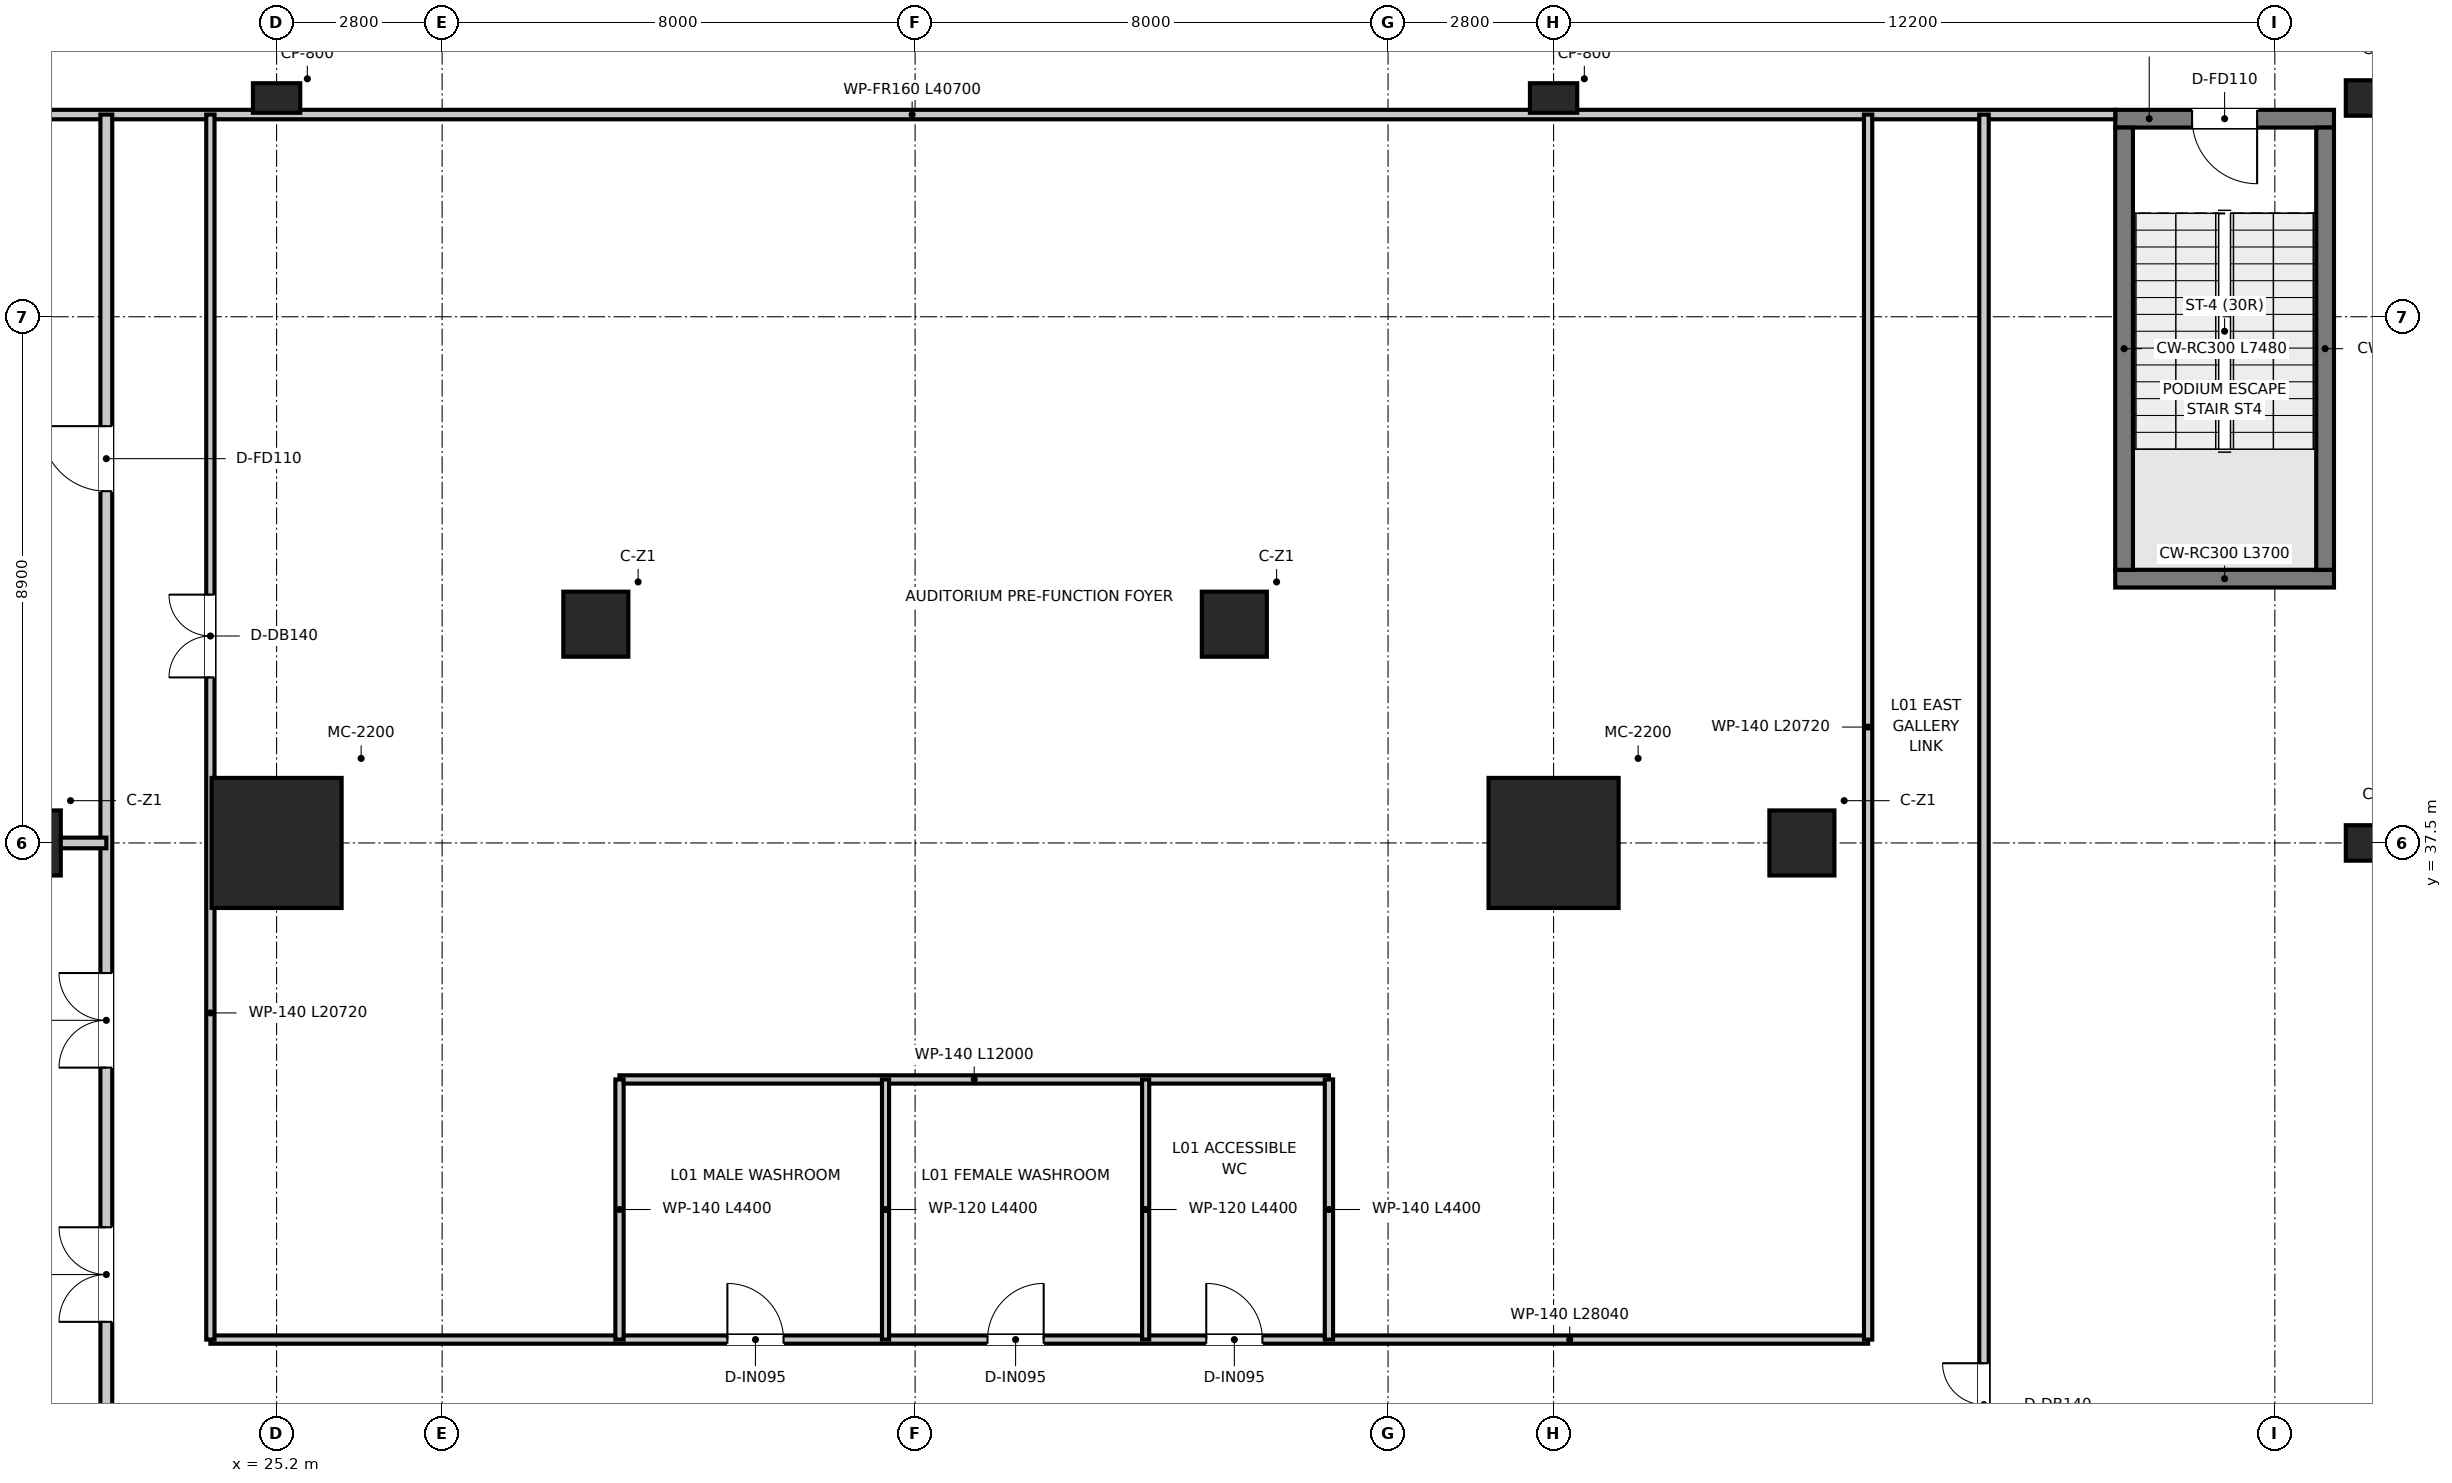
"""IFC4 building model, lengths in metres.
Left out: names, types, materials, properties, quantities, classifications, styles, units other than length and angle.
Written with IfcOpenShell. Run it as: python <this file> out.ifc"""

import sys

from ifc_helpers import new_model, si_unit, direction, frame, frame_2d, origin, origin_2d, place, context, subcontext, project, spatial, rectangle, extrude, source, transform, mapped, element, fill, save


model = new_model("IFC4")
c1 = context("Model", 3, precision=1e-05, world=origin(), true_north=direction((0.0, 1.0)))
c2 = subcontext(c1, "Body", "Model", "MODEL_VIEW")
j1 = project(units=[si_unit("LENGTHUNIT", "METRE"), si_unit("PLANEANGLEUNIT", "RADIAN")], contexts=[c1])
p1 = place(None, origin())
s1 = spatial("IfcSite", under=j1, at=p1, CompositionType="ELEMENT")
p2 = place(p1, origin())
s2 = spatial("IfcBuilding", under=s1, at=p2, CompositionType="ELEMENT")
p3 = place(p2, frame((0.0, 0.0, 5.4)))
s3 = spatial("IfcBuildingStorey", under=s2, at=p3, CompositionType="ELEMENT", Elevation=5.4)
p4 = place(p3, frame((56.3, 41.97, 0.0), z_axis=(0.0, 0.0, 1.0), x_axis=(1.0, 0.0, 0.0)))
e1 = element("IfcWall", 1, at=p4, inside=s3, PredefinedType="SHEAR", context=c2, shape_type="SweptSolid", body=[
    extrude(rectangle(XDim=3.7, YDim=0.3, at=frame_2d((1.85, 0.0))), origin(), (0.0, 0.0, 1.0), 5.0),
])
p5 = place(p3, frame((60.0, 49.75, 0.0), z_axis=(0.0, 0.0, 1.0), x_axis=(-1.0, 0.0, 0.0)))
e2 = element("IfcWall", 2, at=p5, inside=s3, PredefinedType="SHEAR", context=c2, shape_type="SweptSolid", body=[
    extrude(rectangle(XDim=3.7, YDim=0.3, at=frame_2d((1.85, 0.0))), origin(), (0.0, 0.0, 1.0), 5.0),
])
p6 = place(p5, frame((1.3, 0.0, 0.0)))
e3 = element("IfcOpeningElement", 3, at=p6, cuts=e2, PredefinedType="OPENING", context=c2, shape_type="SweptSolid", body=[
    extrude(rectangle(XDim=1.1, YDim=2.15, at=frame_2d((0.55, 1.075))), frame((0.0, 0.16, 0.0), z_axis=(0.0, -1.0, 0.0), x_axis=(1.0, 0.0, 0.0)), (0.0, 0.0, 1.0), 0.32),
])
for number, where, z_axis, x_axis in (
    (4, (56.45, 42.12, 0.0), (0.0, 0.0, 1.0), (0.0, 1.0, 0.0)),
    (5, (59.85, 42.12, 0.0), (0.0, 0.0, 1.0), (0.0, 1.0, 0.0)),
):
    element("IfcWall", number, at=place(p3, frame(where, z_axis=z_axis, x_axis=x_axis)), inside=s3, PredefinedType="SHEAR", context=c2, shape_type="SweptSolid", body=[
        extrude(rectangle(XDim=7.48, YDim=0.3, at=frame_2d((3.74, 0.0))), origin(), (0.0, 0.0, 1.0), 5.0),
    ])
m1 = source(origin(), c2, "Body", "SweptSolid", [
    extrude(rectangle(XDim=2.2, YDim=2.2, at=origin_2d()), origin(), (0.0, 0.0, 1.0), 5.0),
])
for number, where, z_axis, x_axis in (
    (6, (46.8, 37.5, 0.0), (0.0, 0.0, 1.0), (1.0, 0.0, 0.0)),
    (7, (25.2, 37.5, 0.0), (0.0, 0.0, 1.0), (1.0, 0.0, 0.0)),
):
    element("IfcColumn", number, at=place(p3, frame(where, z_axis=z_axis, x_axis=x_axis)), inside=s3, PredefinedType="USERDEFINED", context=c2, shape_type="MappedRepresentation", body=[
        mapped(m1, transform((0.0, 0.0, 0.0), x_axis=(1.0, 0.0, 0.0), y_axis=(0.0, 1.0, 0.0), z_axis=(0.0, 0.0, 1.0), scale=1.0)),
    ])
m2 = source(origin(), c2, "Body", "SweptSolid", [
    extrude(rectangle(XDim=1.1, YDim=1.1, at=origin_2d()), origin(), (0.0, 0.0, 1.0), 5.0),
])
for number, where, z_axis, x_axis in (
    (8, (21.0, 37.5, 0.0), (0.0, 0.0, 1.0), (1.0, 0.0, 0.0)),
    (9, (30.6, 41.2, 0.0), (0.0, 0.0, 1.0), (1.0, 0.0, 0.0)),
    (10, (41.4, 41.2, 0.0), (0.0, 0.0, 1.0), (1.0, 0.0, 0.0)),
    (11, (51.0, 37.5, 0.0), (0.0, 0.0, 1.0), (1.0, 0.0, 0.0)),
):
    element("IfcColumn", number, at=place(p3, frame(where, z_axis=z_axis, x_axis=x_axis)), inside=s3, PredefinedType="COLUMN", context=c2, shape_type="MappedRepresentation", body=[
        mapped(m2, transform((0.0, 0.0, 0.0), x_axis=(1.0, 0.0, 0.0), y_axis=(0.0, 1.0, 0.0), z_axis=(0.0, 0.0, 1.0), scale=1.0)),
    ])
m3 = source(origin(), c2, "Body", "SweptSolid", [
    extrude(rectangle(XDim=0.6, YDim=0.6, at=origin_2d()), origin(), (0.0, 0.0, 1.0), 5.0),
])
for number, where, z_axis, x_axis in (
    (12, (60.5, 37.5, 0.0), (0.0, 0.0, 1.0), (1.0, 0.0, 0.0)),
    (13, (60.5, 50.1, 0.0), (0.0, 0.0, 1.0), (1.0, 0.0, 0.0)),
):
    element("IfcColumn", number, at=place(p3, frame(where, z_axis=z_axis, x_axis=x_axis)), inside=s3, PredefinedType="COLUMN", context=c2, shape_type="MappedRepresentation", body=[
        mapped(m3, transform((0.0, 0.0, 0.0), x_axis=(1.0, 0.0, 0.0), y_axis=(0.0, 1.0, 0.0), z_axis=(0.0, 0.0, 1.0), scale=1.0)),
    ])
m4 = source(origin(), c2, "Body", "SweptSolid", [
    extrude(rectangle(XDim=0.8, YDim=0.5, at=origin_2d()), origin(), (0.0, 0.0, 1.0), 5.0),
])
for number, where, z_axis, x_axis in (
    (14, (25.2, 50.1, 0.0), (0.0, 0.0, 1.0), (1.0, 0.0, 0.0)),
    (15, (46.8, 50.1, 0.0), (0.0, 0.0, 1.0), (1.0, 0.0, 0.0)),
):
    element("IfcColumn", number, at=place(p3, frame(where, z_axis=z_axis, x_axis=x_axis)), inside=s3, PredefinedType="PILASTER", context=c2, shape_type="MappedRepresentation", body=[
        mapped(m4, transform((0.0, 0.0, 0.0), x_axis=(1.0, 0.0, 0.0), y_axis=(0.0, 1.0, 0.0), z_axis=(0.0, 0.0, 1.0), scale=1.0)),
    ])
p7 = place(p3, frame((24.08, 29.1, 0.0), z_axis=(0.0, 0.0, 1.0), x_axis=(1.0, 0.0, 0.0)))
e16 = element("IfcWall", 16, at=p7, inside=s3, PredefinedType="PARTITIONING", context=c2, shape_type="SweptSolid", body=[
    extrude(rectangle(XDim=28.04, YDim=0.14, at=frame_2d((14.02, 0.0))), origin(), (0.0, 0.0, 1.0), 3.9),
])
p8 = place(p7, frame((8.745, 0.0, 0.0)))
e17 = element("IfcOpeningElement", 17, at=p8, cuts=e16, PredefinedType="OPENING", context=c2, shape_type="SweptSolid", body=[
    extrude(rectangle(XDim=0.95, YDim=2.1, at=frame_2d((0.475, 1.05))), frame((0.0, 0.08, 0.0), z_axis=(0.0, -1.0, 0.0), x_axis=(1.0, 0.0, 0.0)), (0.0, 0.0, 1.0), 0.16),
])
p9 = place(p7, frame((13.145, 0.0, 0.0)))
e18 = element("IfcOpeningElement", 18, at=p9, cuts=e16, PredefinedType="OPENING", context=c2, shape_type="SweptSolid", body=[
    extrude(rectangle(XDim=0.95, YDim=2.1, at=frame_2d((0.475, 1.05))), frame((0.0, 0.08, 0.0), z_axis=(0.0, -1.0, 0.0), x_axis=(1.0, 0.0, 0.0)), (0.0, 0.0, 1.0), 0.16),
])
p10 = place(p7, frame((16.845, 0.0, 0.0)))
e19 = element("IfcOpeningElement", 19, at=p10, cuts=e16, PredefinedType="OPENING", context=c2, shape_type="SweptSolid", body=[
    extrude(rectangle(XDim=0.95, YDim=2.1, at=frame_2d((0.475, 1.05))), frame((0.0, 0.08, 0.0), z_axis=(0.0, -1.0, 0.0), x_axis=(1.0, 0.0, 0.0)), (0.0, 0.0, 1.0), 0.16),
])
p11 = place(p3, frame((15.6, 49.82, 0.0), z_axis=(0.0, 0.0, 1.0), x_axis=(1.0, 0.0, 0.0)))
e20 = element("IfcWall", 20, at=p11, inside=s3, PredefinedType="PARTITIONING", context=c2, shape_type="SweptSolid", body=[
    extrude(rectangle(XDim=40.7, YDim=0.16, at=frame_2d((20.35, 0.0))), origin(), (0.0, 0.0, 1.0), 4.01),
])
p12 = place(p3, frame((22.32, 0.605, 0.0), z_axis=(0.0, 0.0, 1.0), x_axis=(0.0, 1.0, 0.0)))
e21 = element("IfcWall", 21, at=p12, inside=s3, PredefinedType="PARTITIONING", context=c2, shape_type="SweptSolid", body=[
    extrude(rectangle(XDim=49.215, YDim=0.2, at=frame_2d((24.607, 0.0))), origin(), (0.0, 0.0, 1.0), 4.0),
])
p13 = place(p12, frame((28.795, 0.0, 0.0)))
e22 = element("IfcOpeningElement", 22, at=p13, cuts=e21, PredefinedType="OPENING", context=c2, shape_type="SweptSolid", body=[
    extrude(rectangle(XDim=1.6, YDim=2.2, at=frame_2d((0.8, 1.1))), frame((0.0, 0.11, 0.0), z_axis=(0.0, -1.0, 0.0), x_axis=(1.0, 0.0, 0.0)), (0.0, 0.0, 1.0), 0.22),
])
p14 = place(p12, frame((33.095, 0.0, 0.0)))
e23 = element("IfcOpeningElement", 23, at=p14, cuts=e21, PredefinedType="OPENING", context=c2, shape_type="SweptSolid", body=[
    extrude(rectangle(XDim=1.6, YDim=2.2, at=frame_2d((0.8, 1.1))), frame((0.0, 0.11, 0.0), z_axis=(0.0, -1.0, 0.0), x_axis=(1.0, 0.0, 0.0)), (0.0, 0.0, 1.0), 0.22),
])
p15 = place(p12, frame((42.845, 0.0, 0.0)))
e24 = element("IfcOpeningElement", 24, at=p15, cuts=e21, PredefinedType="OPENING", context=c2, shape_type="SweptSolid", body=[
    extrude(rectangle(XDim=1.1, YDim=2.15, at=frame_2d((0.55, 1.075))), frame((0.0, 0.11, 0.0), z_axis=(0.0, -1.0, 0.0), x_axis=(1.0, 0.0, 0.0)), (0.0, 0.0, 1.0), 0.22),
])
p16 = place(p3, frame((24.08, 29.1, 0.0), z_axis=(0.0, 0.0, 1.0), x_axis=(0.0, 1.0, 0.0)))
e25 = element("IfcWall", 25, at=p16, inside=s3, PredefinedType="PARTITIONING", context=c2, shape_type="SweptSolid", body=[
    extrude(rectangle(XDim=20.72, YDim=0.14, at=frame_2d((10.36, 0.0))), origin(), (0.0, 0.0, 1.0), 4.0),
])
p17 = place(p16, frame((11.2, 0.0, 0.0)))
e26 = element("IfcOpeningElement", 26, at=p17, cuts=e25, PredefinedType="OPENING", context=c2, shape_type="SweptSolid", body=[
    extrude(rectangle(XDim=1.4, YDim=2.2, at=frame_2d((0.7, 1.1))), frame((0.0, 0.08, 0.0), z_axis=(0.0, -1.0, 0.0), x_axis=(1.0, 0.0, 0.0)), (0.0, 0.0, 1.0), 0.16),
])
p18 = place(p3, frame((52.12, 29.1, 0.0), z_axis=(0.0, 0.0, 1.0), x_axis=(0.0, 1.0, 0.0)))
e27 = element("IfcWall", 27, at=p18, inside=s3, PredefinedType="PARTITIONING", context=c2, shape_type="SweptSolid", body=[
    extrude(rectangle(XDim=20.72, YDim=0.14, at=frame_2d((10.36, 0.0))), origin(), (0.0, 0.0, 1.0), 4.06),
])
p19 = place(p3, frame((54.08, 0.605, 0.0), z_axis=(0.0, 0.0, 1.0), x_axis=(0.0, 1.0, 0.0)))
e28 = element("IfcWall", 28, at=p19, inside=s3, PredefinedType="PARTITIONING", context=c2, shape_type="SweptSolid", body=[
    extrude(rectangle(XDim=49.215, YDim=0.16, at=frame_2d((24.607, 0.0))), origin(), (0.0, 0.0, 1.0), 4.06),
])
p20 = place(p19, frame((26.695, 0.0, 0.0)))
e29 = element("IfcOpeningElement", 29, at=p20, cuts=e28, PredefinedType="OPENING", context=c2, shape_type="SweptSolid", body=[
    extrude(rectangle(XDim=1.4, YDim=2.2, at=frame_2d((0.7, 1.1))), frame((0.0, 0.09, 0.0), z_axis=(0.0, -1.0, 0.0), x_axis=(1.0, 0.0, 0.0)), (0.0, 0.0, 1.0), 0.18),
])
p21 = place(p3, frame((31.0, 33.5, 0.0), z_axis=(0.0, 0.0, 1.0), x_axis=(1.0, 0.0, 0.0)))
e30 = element("IfcWall", 30, at=p21, inside=s3, PredefinedType="PARTITIONING", context=c2, shape_type="SweptSolid", body=[
    extrude(rectangle(XDim=12.0, YDim=0.14, at=frame_2d((6.0, 0.0))), origin(), (0.0, 0.0, 1.0), 4.7),
])
for number, where, z_axis, x_axis in (
    (31, (31.0, 29.1, 0.0), (0.0, 0.0, 1.0), (0.0, 1.0, 0.0)),
    (32, (43.0, 29.1, 0.0), (0.0, 0.0, 1.0), (0.0, 1.0, 0.0)),
):
    element("IfcWall", number, at=place(p3, frame(where, z_axis=z_axis, x_axis=x_axis)), inside=s3, PredefinedType="PARTITIONING", context=c2, shape_type="SweptSolid", body=[
        extrude(rectangle(XDim=4.4, YDim=0.14, at=frame_2d((2.2, 0.0))), origin(), (0.0, 0.0, 1.0), 4.15),
    ])
for number, where, z_axis, x_axis in (
    (33, (35.5, 29.1, 0.0), (0.0, 0.0, 1.0), (0.0, 1.0, 0.0)),
    (34, (39.9, 29.1, 0.0), (0.0, 0.0, 1.0), (0.0, 1.0, 0.0)),
):
    element("IfcWall", number, at=place(p3, frame(where, z_axis=z_axis, x_axis=x_axis)), inside=s3, PredefinedType="PARTITIONING", context=c2, shape_type="SweptSolid", body=[
        extrude(rectangle(XDim=4.4, YDim=0.12, at=frame_2d((2.2, 0.0))), origin(), (0.0, 0.0, 1.0), 4.15),
    ])
p22 = place(p3, frame((0.305, 37.5, 0.0), z_axis=(0.0, 0.0, 1.0), x_axis=(1.0, 0.0, 0.0)))
e35 = element("IfcWall", 35, at=p22, inside=s3, PredefinedType="PARTITIONING", context=c2, shape_type="SweptSolid", body=[
    extrude(rectangle(XDim=22.015, YDim=0.18, at=frame_2d((11.008, 0.0))), origin(), (0.0, 0.0, 1.0), 2.9),
])
p23 = place(p6, origin())
e36 = element("IfcDoor", 36, at=p23, inside=s3, OperationType="SINGLE_SWING_LEFT", PredefinedType="DOOR", context=c2, shape_type="SweptSolid", body=[
    extrude(rectangle(XDim=1.1, YDim=2.15, at=frame_2d((0.55, 1.075))), frame((0.0, 0.025, 0.0), z_axis=(0.0, -1.0, 0.0), x_axis=(1.0, 0.0, 0.0)), (0.0, 0.0, 1.0), 0.05),
])
fill(e3, e36)
p24 = place(p8, origin())
e37 = element("IfcDoor", 37, at=p24, inside=s3, OperationType="SINGLE_SWING_LEFT", PredefinedType="DOOR", context=c2, shape_type="SweptSolid", body=[
    extrude(rectangle(XDim=0.95, YDim=2.1, at=frame_2d((0.475, 1.05))), frame((0.0, 0.025, 0.0), z_axis=(0.0, -1.0, 0.0), x_axis=(1.0, 0.0, 0.0)), (0.0, 0.0, 1.0), 0.05),
])
fill(e17, e37)
p25 = place(p9, origin())
e38 = element("IfcDoor", 38, at=p25, inside=s3, OperationType="SINGLE_SWING_RIGHT", PredefinedType="DOOR", context=c2, shape_type="SweptSolid", body=[
    extrude(rectangle(XDim=0.95, YDim=2.1, at=frame_2d((0.475, 1.05))), frame((0.0, 0.025, 0.0), z_axis=(0.0, -1.0, 0.0), x_axis=(1.0, 0.0, 0.0)), (0.0, 0.0, 1.0), 0.05),
])
fill(e18, e38)
p26 = place(p10, origin())
e39 = element("IfcDoor", 39, at=p26, inside=s3, OperationType="SINGLE_SWING_LEFT", PredefinedType="DOOR", context=c2, shape_type="SweptSolid", body=[
    extrude(rectangle(XDim=0.95, YDim=2.1, at=frame_2d((0.475, 1.05))), frame((0.0, 0.025, 0.0), z_axis=(0.0, -1.0, 0.0), x_axis=(1.0, 0.0, 0.0)), (0.0, 0.0, 1.0), 0.05),
])
fill(e19, e39)
p27 = place(p13, origin())
e40 = element("IfcDoor", 40, at=p27, inside=s3, OperationType="DOUBLE_DOOR_SINGLE_SWING", PredefinedType="DOOR", context=c2, shape_type="SweptSolid", body=[
    extrude(rectangle(XDim=1.6, YDim=2.2, at=frame_2d((0.8, 1.1))), frame((0.0, 0.025, 0.0), z_axis=(0.0, -1.0, 0.0), x_axis=(1.0, 0.0, 0.0)), (0.0, 0.0, 1.0), 0.05),
])
fill(e22, e40)
p28 = place(p14, origin())
e41 = element("IfcDoor", 41, at=p28, inside=s3, OperationType="DOUBLE_DOOR_SINGLE_SWING", PredefinedType="DOOR", context=c2, shape_type="SweptSolid", body=[
    extrude(rectangle(XDim=1.6, YDim=2.2, at=frame_2d((0.8, 1.1))), frame((0.0, 0.025, 0.0), z_axis=(0.0, -1.0, 0.0), x_axis=(1.0, 0.0, 0.0)), (0.0, 0.0, 1.0), 0.05),
])
fill(e23, e41)
p29 = place(p15, origin())
e42 = element("IfcDoor", 42, at=p29, inside=s3, OperationType="SINGLE_SWING_RIGHT", PredefinedType="DOOR", context=c2, shape_type="SweptSolid", body=[
    extrude(rectangle(XDim=1.1, YDim=2.15, at=frame_2d((0.55, 1.075))), frame((0.0, 0.025, 0.0), z_axis=(0.0, -1.0, 0.0), x_axis=(1.0, 0.0, 0.0)), (0.0, 0.0, 1.0), 0.05),
])
fill(e24, e42)
p30 = place(p17, origin())
e43 = element("IfcDoor", 43, at=p30, inside=s3, OperationType="DOUBLE_DOOR_SINGLE_SWING", PredefinedType="DOOR", context=c2, shape_type="SweptSolid", body=[
    extrude(rectangle(XDim=1.4, YDim=2.2, at=frame_2d((0.7, 1.1))), frame((0.0, 0.025, 0.0), z_axis=(0.0, -1.0, 0.0), x_axis=(1.0, 0.0, 0.0)), (0.0, 0.0, 1.0), 0.05),
])
fill(e26, e43)
p31 = place(p20, origin())
e44 = element("IfcDoor", 44, at=p31, inside=s3, OperationType="DOUBLE_DOOR_SINGLE_SWING", PredefinedType="DOOR", context=c2, shape_type="SweptSolid", body=[
    extrude(rectangle(XDim=1.4, YDim=2.2, at=frame_2d((0.7, 1.1))), frame((0.0, 0.025, 0.0), z_axis=(0.0, -1.0, 0.0), x_axis=(1.0, 0.0, 0.0)), (0.0, 0.0, 1.0), 0.05),
])
fill(e29, e44)
save(model, sys.argv[1])
